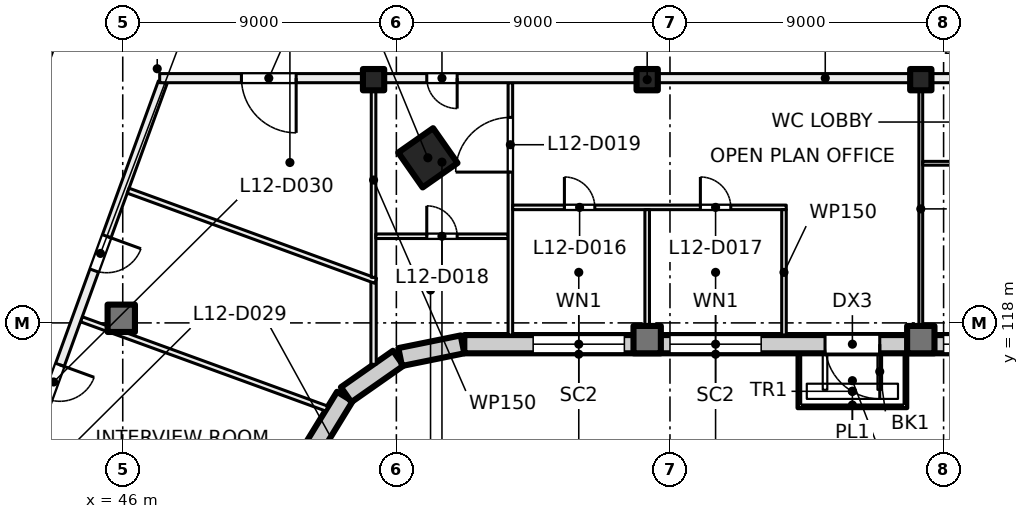
"""IFC4 building model, lengths in metres.
Left out: names, types, materials, properties, quantities, classifications, styles, units other than length and angle.
Written with IfcOpenShell. Run it as: python <this file> out.ifc"""

import sys

from ifc_helpers import new_model, si_unit, direction, frame, frame_2d, origin, origin_2d, place, context, subcontext, project, spatial, rectangle, hollow_rectangle, extrude, element, fill, save


model = new_model("IFC4")
c1 = context("Model", 3, precision=1e-05, world=origin(), true_north=direction((0.0, 1.0)))
c2 = subcontext(c1, "Body", "Model", "MODEL_VIEW")
j1 = project(units=[si_unit("LENGTHUNIT", "METRE"), si_unit("PLANEANGLEUNIT", "RADIAN")], contexts=[c1])
p1 = place(None, origin())
s1 = spatial("IfcSite", under=j1, at=p1, CompositionType="ELEMENT")
p2 = place(p1, origin())
s2 = spatial("IfcBuilding", under=s1, at=p2, CompositionType="ELEMENT")
p3 = place(p2, frame((0.0, 0.0, 55.5)))
s3 = spatial("IfcBuildingStorey", under=s2, at=p3, CompositionType="ELEMENT", Elevation=55.5)
p4 = place(p3, frame((56.036, 123.43, 0.0), z_axis=(0.0, 0.0, 1.0), x_axis=(0.573576436351, -0.819152044289, 0.0)))
e1 = element("IfcColumn", 1, at=p4, inside=s3, PredefinedType="COLUMN", context=c2, shape_type="SweptSolid", body=[
    extrude(hollow_rectangle(XDim=1.4, YDim=1.4, WallThickness=0.04, at=origin_2d()), origin(), (0.0, 0.0, 1.0), 4.0),
])
for number, where, z_axis, x_axis in (
    (2, (54.25, 126.0, 0.0), (0.0, 0.0, 1.0), (1.0, 0.0, 0.0)),
    (3, (63.25, 126.0, 0.0), (0.0, 0.0, 1.0), (1.0, 0.0, 0.0)),
    (4, (72.25, 126.0, 0.0), (0.0, 0.0, 1.0), (1.0, 0.0, 0.0)),
):
    element("IfcColumn", number, at=place(p3, frame(where, z_axis=z_axis, x_axis=x_axis)), inside=s3, PredefinedType="COLUMN", context=c2, shape_type="SweptSolid", body=[
        extrude(rectangle(XDim=0.7, YDim=0.7, at=origin_2d()), origin(), (0.0, 0.0, 1.0), 4.0),
    ])
for number, where, z_axis, x_axis in (
    (5, (45.952, 118.152, 0.0), (0.0, 0.0, 1.0), (1.0, 0.0, 0.0)),
    (6, (63.25, 117.45, 0.0), (0.0, 0.0, 1.0), (1.0, 0.0, 0.0)),
    (7, (72.25, 117.45, 0.0), (0.0, 0.0, 1.0), (1.0, 0.0, 0.0)),
):
    element("IfcColumn", number, at=place(p3, frame(where, z_axis=z_axis, x_axis=x_axis)), inside=s3, PredefinedType="COLUMN", context=c2, shape_type="SweptSolid", body=[
        extrude(rectangle(XDim=0.9, YDim=0.9, at=origin_2d()), origin(), (0.0, 0.0, 1.0), 4.0),
    ])
p5 = place(p3, frame((53.305, 115.578, 0.0), z_axis=(0.0, 0.0, 1.0), x_axis=(-0.522402266438, -0.852699168535, 0.0)))
e8 = element("IfcWall", 8, at=p5, inside=s3, PredefinedType="SOLIDWALL", context=c2, shape_type="SweptSolid", body=[
    extrude(rectangle(XDim=2.042, YDim=0.6, at=frame_2d((1.021, 0.0))), origin(), (0.0, 0.0, 1.0), 3.625),
])
for number, where, z_axis, x_axis in (
    (9, (55.062, 116.839, 0.0), (0.0, 0.0, 1.0), (-0.819, -0.574, 0.0)),
    (10, (57.175, 117.294, 0.0), (0.0, 0.0, 1.0), (-0.98, -0.199, 0.0)),
):
    element("IfcWall", number, at=place(p3, frame(where, z_axis=z_axis, x_axis=x_axis)), inside=s3, PredefinedType="SOLIDWALL", context=c2, shape_type="SweptSolid", body=[
        extrude(rectangle(XDim=2.092, YDim=0.6, at=frame_2d((1.046, 0.0))), origin(), (0.0, 0.0, 1.0), 3.625),
    ])
p6 = place(p3, frame((90.98, 117.3, 0.0), z_axis=(0.0, 0.0, 1.0), x_axis=(-1.0, 0.0, 0.0)))
e11 = element("IfcWall", 11, at=p6, inside=s3, PredefinedType="SOLIDWALL", context=c2, shape_type="SweptSolid", body=[
    extrude(rectangle(XDim=33.745, YDim=0.6, at=frame_2d((16.873, 0.0))), origin(), (0.0, 0.0, 1.0), 3.625),
])
p7 = place(p6, frame((1.48, 0.0, 0.9)))
e12 = element("IfcOpeningElement", 12, at=p7, cuts=e11, PredefinedType="OPENING", context=c2, shape_type="SweptSolid", body=[
    extrude(rectangle(XDim=3.0, YDim=2.4, at=frame_2d((1.5, 1.2))), frame((0.0, 0.31, 0.0), z_axis=(0.0, -1.0, 0.0), x_axis=(1.0, 0.0, 0.0)), (0.0, 0.0, 1.0), 0.62),
])
p8 = place(p6, frame((5.98, 0.0, 0.9)))
e13 = element("IfcOpeningElement", 13, at=p8, cuts=e11, PredefinedType="OPENING", context=c2, shape_type="SweptSolid", body=[
    extrude(rectangle(XDim=3.0, YDim=2.4, at=frame_2d((1.5, 1.2))), frame((0.0, 0.31, 0.0), z_axis=(0.0, -1.0, 0.0), x_axis=(1.0, 0.0, 0.0)), (0.0, 0.0, 1.0), 0.62),
])
p9 = place(p6, frame((10.48, 0.0, 0.9)))
e14 = element("IfcOpeningElement", 14, at=p9, cuts=e11, PredefinedType="OPENING", context=c2, shape_type="SweptSolid", body=[
    extrude(rectangle(XDim=3.0, YDim=2.4, at=frame_2d((1.5, 1.2))), frame((0.0, 0.31, 0.0), z_axis=(0.0, -1.0, 0.0), x_axis=(1.0, 0.0, 0.0)), (0.0, 0.0, 1.0), 0.62),
])
p10 = place(p6, frame((14.98, 0.0, 0.9)))
e15 = element("IfcOpeningElement", 15, at=p10, cuts=e11, PredefinedType="OPENING", context=c2, shape_type="SweptSolid", body=[
    extrude(rectangle(XDim=3.0, YDim=2.4, at=frame_2d((1.5, 1.2))), frame((0.0, 0.31, 0.0), z_axis=(0.0, -1.0, 0.0), x_axis=(1.0, 0.0, 0.0)), (0.0, 0.0, 1.0), 0.62),
])
p11 = place(p6, frame((20.08, 0.0, 0.0)))
e16 = element("IfcOpeningElement", 16, at=p11, cuts=e11, PredefinedType="OPENING", context=c2, shape_type="SweptSolid", body=[
    extrude(rectangle(XDim=1.8, YDim=2.4, at=frame_2d((0.9, 1.2))), frame((0.0, 0.31, 0.0), z_axis=(0.0, -1.0, 0.0), x_axis=(1.0, 0.0, 0.0)), (0.0, 0.0, 1.0), 0.62),
])
p12 = place(p6, frame((23.98, 0.0, 0.9)))
e17 = element("IfcOpeningElement", 17, at=p12, cuts=e11, PredefinedType="OPENING", context=c2, shape_type="SweptSolid", body=[
    extrude(rectangle(XDim=3.0, YDim=2.4, at=frame_2d((1.5, 1.2))), frame((0.0, 0.31, 0.0), z_axis=(0.0, -1.0, 0.0), x_axis=(1.0, 0.0, 0.0)), (0.0, 0.0, 1.0), 0.62),
])
p13 = place(p6, frame((28.48, 0.0, 0.9)))
e18 = element("IfcOpeningElement", 18, at=p13, cuts=e11, PredefinedType="OPENING", context=c2, shape_type="SweptSolid", body=[
    extrude(rectangle(XDim=3.0, YDim=2.4, at=frame_2d((1.5, 1.2))), frame((0.0, 0.31, 0.0), z_axis=(0.0, -1.0, 0.0), x_axis=(1.0, 0.0, 0.0)), (0.0, 0.0, 1.0), 0.62),
])
p14 = place(p3, frame((32.881, 97.657, 0.0), z_axis=(0.0, 0.0, 1.0), x_axis=(0.342017360004, 0.939693633828, 0.0)))
e19 = element("IfcWall", 19, at=p14, inside=s3, PredefinedType="PARTITIONING", context=c2, shape_type="SweptSolid", body=[
    extrude(rectangle(XDim=34.516, YDim=0.3, at=frame_2d((17.258, 0.0))), origin(), (0.0, 0.0, 1.0), 3.625),
])
p15 = place(p14, frame((12.975, 0.0, 0.0)))
e20 = element("IfcOpeningElement", 20, at=p15, cuts=e19, PredefinedType="OPENING", context=c2, shape_type="SweptSolid", body=[
    extrude(rectangle(XDim=1.8, YDim=2.1, at=frame_2d((0.9, 1.05))), frame((0.0, 0.16, 0.0), z_axis=(0.0, -1.0, 0.0), x_axis=(1.0, 0.0, 0.0)), (0.0, 0.0, 1.0), 0.32),
])
p16 = place(p3, frame((44.639, 118.12, 0.0), z_axis=(0.0, 0.0, 1.0), x_axis=(0.939669707102, -0.342083091593, 0.0)))
e21 = element("IfcWall", 21, at=p16, inside=s3, PredefinedType="PARTITIONING", context=c2, shape_type="SweptSolid", body=[
    extrude(rectangle(XDim=8.589, YDim=0.175, at=frame_2d((4.295, 0.0))), origin(), (0.0, 0.0, 1.0), 3.625),
])
p17 = place(p3, frame((47.314, 125.909, 0.0), z_axis=(0.0, 0.0, 1.0), x_axis=(-0.342010770371, -0.939696032209, 0.0)))
e22 = element("IfcWall", 22, at=p17, inside=s3, PredefinedType="PARTITIONING", context=c2, shape_type="SweptSolid", body=[
    extrude(rectangle(XDim=31.485, YDim=0.3, at=frame_2d((15.742, 0.0))), origin(), (0.0, 0.0, 1.0), 3.625),
])
p18 = place(p17, frame((28.259, 0.0, 0.0)))
e23 = element("IfcOpeningElement", 23, at=p18, cuts=e22, PredefinedType="OPENING", context=c2, shape_type="SweptSolid", body=[
    extrude(rectangle(XDim=1.2, YDim=2.1, at=frame_2d((0.6, 1.05))), frame((0.0, 0.16, 0.0), z_axis=(0.0, -1.0, 0.0), x_axis=(1.0, 0.0, 0.0)), (0.0, 0.0, 1.0), 0.32),
])
p19 = place(p17, frame((23.484, 0.0, 0.0)))
e24 = element("IfcOpeningElement", 24, at=p19, cuts=e22, PredefinedType="OPENING", context=c2, shape_type="SweptSolid", body=[
    extrude(rectangle(XDim=1.0, YDim=2.1, at=frame_2d((0.5, 1.05))), frame((0.0, 0.16, 0.0), z_axis=(0.0, -1.0, 0.0), x_axis=(1.0, 0.0, 0.0)), (0.0, 0.0, 1.0), 0.32),
])
p20 = place(p17, frame((18.984, 0.0, 0.0)))
e25 = element("IfcOpeningElement", 25, at=p20, cuts=e22, PredefinedType="OPENING", context=c2, shape_type="SweptSolid", body=[
    extrude(rectangle(XDim=1.0, YDim=2.1, at=frame_2d((0.5, 1.05))), frame((0.0, 0.16, 0.0), z_axis=(0.0, -1.0, 0.0), x_axis=(1.0, 0.0, 0.0)), (0.0, 0.0, 1.0), 0.32),
])
p21 = place(p17, frame((14.385, 0.0, 0.0)))
e26 = element("IfcOpeningElement", 26, at=p21, cuts=e22, PredefinedType="OPENING", context=c2, shape_type="SweptSolid", body=[
    extrude(rectangle(XDim=1.2, YDim=2.1, at=frame_2d((0.6, 1.05))), frame((0.0, 0.16, 0.0), z_axis=(0.0, -1.0, 0.0), x_axis=(1.0, 0.0, 0.0)), (0.0, 0.0, 1.0), 0.32),
])
p22 = place(p17, frame((9.885, 0.0, 0.0)))
e27 = element("IfcOpeningElement", 27, at=p22, cuts=e22, PredefinedType="OPENING", context=c2, shape_type="SweptSolid", body=[
    extrude(rectangle(XDim=1.2, YDim=2.1, at=frame_2d((0.6, 1.05))), frame((0.0, 0.16, 0.0), z_axis=(0.0, -1.0, 0.0), x_axis=(1.0, 0.0, 0.0)), (0.0, 0.0, 1.0), 0.32),
])
p23 = place(p17, frame((5.384, 0.0, 0.0)))
e28 = element("IfcOpeningElement", 28, at=p23, cuts=e22, PredefinedType="OPENING", context=c2, shape_type="SweptSolid", body=[
    extrude(rectangle(XDim=1.2, YDim=2.1, at=frame_2d((0.6, 1.05))), frame((0.0, 0.16, 0.0), z_axis=(0.0, -1.0, 0.0), x_axis=(1.0, 0.0, 0.0)), (0.0, 0.0, 1.0), 0.32),
])
p24 = place(p3, frame((54.25, 116.637, 0.0), z_axis=(0.0, 0.0, 1.0), x_axis=(0.0, 1.0, 0.0)))
e29 = element("IfcWall", 29, at=p24, inside=s3, PredefinedType="PARTITIONING", context=c2, shape_type="SweptSolid", body=[
    extrude(rectangle(XDim=2.776, YDim=0.175, at=frame_2d((1.388, 0.0))), origin(), (0.0, 0.0, 1.0), 3.625),
])
p25 = place(p3, frame((54.32, 119.384, 0.0), z_axis=(0.0, 0.0, 1.0), x_axis=(-0.939632908118, 0.342184157994, 0.0)))
e30 = element("IfcWall", 30, at=p25, inside=s3, PredefinedType="PARTITIONING", context=c2, shape_type="SweptSolid", body=[
    extrude(rectangle(XDim=8.665, YDim=0.175, at=frame_2d((4.333, 0.0))), origin(), (0.0, 0.0, 1.0), 3.625),
])
p26 = place(p3, frame((54.25, 119.498, 0.0), z_axis=(0.0, 0.0, 1.0), x_axis=(0.0, 1.0, 0.0)))
e31 = element("IfcWall", 31, at=p26, inside=s3, PredefinedType="PARTITIONING", context=c2, shape_type="SweptSolid", body=[
    extrude(rectangle(XDim=6.402, YDim=0.15, at=frame_2d((3.201, 0.0))), origin(), (0.0, 0.0, 1.0), 3.625),
])
p27 = place(p3, frame((54.325, 120.85, 0.0), z_axis=(0.0, 0.0, 1.0), x_axis=(1.0, 0.0, 0.0)))
e32 = element("IfcWall", 32, at=p27, inside=s3, PredefinedType="PARTITIONING", context=c2, shape_type="SweptSolid", body=[
    extrude(rectangle(XDim=4.35, YDim=0.15, at=frame_2d((2.175, 0.0))), origin(), (0.0, 0.0, 1.0), 3.625),
])
p28 = place(p27, frame((1.675, 0.0, 0.0)))
e33 = element("IfcOpeningElement", 33, at=p28, cuts=e32, PredefinedType="OPENING", context=c2, shape_type="SweptSolid", body=[
    extrude(rectangle(XDim=1.0, YDim=2.1, at=frame_2d((0.5, 1.05))), frame((0.0, 0.085, 0.0), z_axis=(0.0, -1.0, 0.0), x_axis=(1.0, 0.0, 0.0)), (0.0, 0.0, 1.0), 0.17),
])
p29 = place(p3, frame((58.75, 117.6, 0.0), z_axis=(0.0, 0.0, 1.0), x_axis=(0.0, 1.0, 0.0)))
e34 = element("IfcWall", 34, at=p29, inside=s3, PredefinedType="PARTITIONING", context=c2, shape_type="SweptSolid", body=[
    extrude(rectangle(XDim=8.3, YDim=0.15, at=frame_2d((4.15, 0.0))), origin(), (0.0, 0.0, 1.0), 3.625),
])
p30 = place(p29, frame((5.36, 0.0, 0.0)))
e35 = element("IfcOpeningElement", 35, at=p30, cuts=e34, PredefinedType="OPENING", context=c2, shape_type="SweptSolid", body=[
    extrude(rectangle(XDim=1.8, YDim=2.1, at=frame_2d((0.9, 1.05))), frame((0.0, 0.085, 0.0), z_axis=(0.0, -1.0, 0.0), x_axis=(1.0, 0.0, 0.0)), (0.0, 0.0, 1.0), 0.17),
])
p31 = place(p3, frame((58.825, 121.8, 0.0), z_axis=(0.0, 0.0, 1.0), x_axis=(1.0, 0.0, 0.0)))
e36 = element("IfcWall", 36, at=p31, inside=s3, PredefinedType="PARTITIONING", context=c2, shape_type="SweptSolid", body=[
    extrude(rectangle(XDim=9.0, YDim=0.15, at=frame_2d((4.5, 0.0))), origin(), (0.0, 0.0, 1.0), 3.625),
])
p32 = place(p31, frame((1.702, 0.0, 0.0)))
e37 = element("IfcOpeningElement", 37, at=p32, cuts=e36, PredefinedType="OPENING", context=c2, shape_type="SweptSolid", body=[
    extrude(rectangle(XDim=1.0, YDim=2.1, at=frame_2d((0.5, 1.05))), frame((0.0, 0.085, 0.0), z_axis=(0.0, -1.0, 0.0), x_axis=(1.0, 0.0, 0.0)), (0.0, 0.0, 1.0), 0.17),
])
p33 = place(p31, frame((6.175, 0.0, 0.0)))
e38 = element("IfcOpeningElement", 38, at=p33, cuts=e36, PredefinedType="OPENING", context=c2, shape_type="SweptSolid", body=[
    extrude(rectangle(XDim=1.0, YDim=2.1, at=frame_2d((0.5, 1.05))), frame((0.0, 0.085, 0.0), z_axis=(0.0, -1.0, 0.0), x_axis=(1.0, 0.0, 0.0)), (0.0, 0.0, 1.0), 0.17),
])
for number, where, z_axis, x_axis in (
    (39, (63.25, 121.725, 0.0), (0.0, 0.0, 1.0), (0.0, -1.0, 0.0)),
    (40, (67.75, 117.6, 0.0), (0.0, 0.0, 1.0), (0.0, 1.0, 0.0)),
):
    element("IfcWall", number, at=place(p3, frame(where, z_axis=z_axis, x_axis=x_axis)), inside=s3, PredefinedType="PARTITIONING", context=c2, shape_type="SweptSolid", body=[
        extrude(rectangle(XDim=4.125, YDim=0.15, at=frame_2d((2.062, 0.0))), origin(), (0.0, 0.0, 1.0), 3.625),
    ])
p34 = place(p3, frame((72.25, 117.6, 0.0), z_axis=(0.0, 0.0, 1.0), x_axis=(0.0, 1.0, 0.0)))
e41 = element("IfcWall", 41, at=p34, inside=s3, PredefinedType="PARTITIONING", context=c2, shape_type="SweptSolid", body=[
    extrude(rectangle(XDim=8.3, YDim=0.125, at=frame_2d((4.15, 0.0))), origin(), (0.0, 0.0, 1.0), 3.625),
])
p35 = place(p3, frame((81.188, 123.25, 0.0), z_axis=(0.0, 0.0, 1.0), x_axis=(-1.0, 0.0, 0.0)))
e42 = element("IfcWall", 42, at=p35, inside=s3, PredefinedType="PARTITIONING", context=c2, shape_type="SweptSolid", body=[
    extrude(rectangle(XDim=8.876, YDim=0.125, at=frame_2d((4.438, 0.0))), origin(), (0.0, 0.0, 1.0), 3.625),
])
p36 = place(p35, frame((6.267, 0.0, 0.0)))
e43 = element("IfcOpeningElement", 43, at=p36, cuts=e42, PredefinedType="OPENING", context=c2, shape_type="SweptSolid", body=[
    extrude(rectangle(XDim=0.8, YDim=2.1, at=frame_2d((0.4, 1.05))), frame((0.0, 0.073, 0.0), z_axis=(0.0, -1.0, 0.0), x_axis=(1.0, 0.0, 0.0)), (0.0, 0.0, 1.0), 0.145),
])
p37 = place(p35, frame((3.037, 0.0, 0.0)))
e44 = element("IfcOpeningElement", 44, at=p37, cuts=e42, PredefinedType="OPENING", context=c2, shape_type="SweptSolid", body=[
    extrude(rectangle(XDim=0.8, YDim=2.1, at=frame_2d((0.4, 1.05))), frame((0.0, 0.073, 0.0), z_axis=(0.0, -1.0, 0.0), x_axis=(1.0, 0.0, 0.0)), (0.0, 0.0, 1.0), 0.145),
])
p38 = place(p3, frame((91.0, 126.05, 0.0), z_axis=(0.0, 0.0, 1.0), x_axis=(-1.0, 0.0, 0.0)))
e45 = element("IfcWall", 45, at=p38, inside=s3, PredefinedType="PARTITIONING", context=c2, shape_type="SweptSolid", body=[
    extrude(rectangle(XDim=43.785, YDim=0.3, at=frame_2d((21.893, 0.0))), origin(), (0.0, 0.0, 1.0), 3.625),
])
p39 = place(p38, frame((4.375, 0.0, 0.0)))
e46 = element("IfcOpeningElement", 46, at=p39, cuts=e45, PredefinedType="OPENING", context=c2, shape_type="SweptSolid", body=[
    extrude(rectangle(XDim=1.0, YDim=2.1, at=frame_2d((0.5, 1.05))), frame((0.0, 0.16, 0.0), z_axis=(0.0, -1.0, 0.0), x_axis=(1.0, 0.0, 0.0)), (0.0, 0.0, 1.0), 0.32),
])
p40 = place(p38, frame((15.0, 0.0, 0.0)))
e47 = element("IfcOpeningElement", 47, at=p40, cuts=e45, PredefinedType="OPENING", context=c2, shape_type="SweptSolid", body=[
    extrude(rectangle(XDim=1.0, YDim=2.1, at=frame_2d((0.5, 1.05))), frame((0.0, 0.16, 0.0), z_axis=(0.0, -1.0, 0.0), x_axis=(1.0, 0.0, 0.0)), (0.0, 0.0, 1.0), 0.32),
])
p41 = place(p38, frame((34.0, 0.0, 0.0)))
e48 = element("IfcOpeningElement", 48, at=p41, cuts=e45, PredefinedType="OPENING", context=c2, shape_type="SweptSolid", body=[
    extrude(rectangle(XDim=1.0, YDim=2.1, at=frame_2d((0.5, 1.05))), frame((0.0, 0.16, 0.0), z_axis=(0.0, -1.0, 0.0), x_axis=(1.0, 0.0, 0.0)), (0.0, 0.0, 1.0), 0.32),
])
p42 = place(p38, frame((39.296, 0.0, 0.0)))
e49 = element("IfcOpeningElement", 49, at=p42, cuts=e45, PredefinedType="OPENING", context=c2, shape_type="SweptSolid", body=[
    extrude(rectangle(XDim=1.8, YDim=2.1, at=frame_2d((0.9, 1.05))), frame((0.0, 0.16, 0.0), z_axis=(0.0, -1.0, 0.0), x_axis=(1.0, 0.0, 0.0)), (0.0, 0.0, 1.0), 0.32),
])
p43 = place(p10, origin())
e50 = element("IfcWindow", 50, at=p43, inside=s3, PartitioningType="SINGLE_PANEL", PredefinedType="WINDOW", context=c2, shape_type="SweptSolid", body=[
    extrude(rectangle(XDim=3.0, YDim=2.4, at=frame_2d((1.5, 1.2))), frame((0.0, 0.03, 0.0), z_axis=(0.0, -1.0, 0.0), x_axis=(1.0, 0.0, 0.0)), (0.0, 0.0, 1.0), 0.06),
])
fill(e15, e50)
p44 = place(p11, origin())
e51 = element("IfcDoor", 51, at=p44, inside=s3, OperationType="DOUBLE_DOOR_SINGLE_SWING", PredefinedType="DOOR", context=c2, shape_type="SweptSolid", body=[
    extrude(rectangle(XDim=1.8, YDim=2.4, at=frame_2d((0.9, 1.2))), frame((0.0, 0.025, 0.0), z_axis=(0.0, -1.0, 0.0), x_axis=(1.0, 0.0, 0.0)), (0.0, 0.0, 1.0), 0.05),
])
fill(e16, e51)
p45 = place(p12, origin())
e52 = element("IfcWindow", 52, at=p45, inside=s3, PartitioningType="SINGLE_PANEL", PredefinedType="WINDOW", context=c2, shape_type="SweptSolid", body=[
    extrude(rectangle(XDim=3.0, YDim=2.4, at=frame_2d((1.5, 1.2))), frame((0.0, 0.03, 0.0), z_axis=(0.0, -1.0, 0.0), x_axis=(1.0, 0.0, 0.0)), (0.0, 0.0, 1.0), 0.06),
])
fill(e17, e52)
p46 = place(p13, origin())
e53 = element("IfcWindow", 53, at=p46, inside=s3, PartitioningType="SINGLE_PANEL", PredefinedType="WINDOW", context=c2, shape_type="SweptSolid", body=[
    extrude(rectangle(XDim=3.0, YDim=2.4, at=frame_2d((1.5, 1.2))), frame((0.0, 0.03, 0.0), z_axis=(0.0, -1.0, 0.0), x_axis=(1.0, 0.0, 0.0)), (0.0, 0.0, 1.0), 0.06),
])
fill(e18, e53)
p47 = place(p41, origin())
e54 = element("IfcDoor", 54, at=p47, inside=s3, OperationType="SINGLE_SWING_LEFT", PredefinedType="DOOR", context=c2, shape_type="SweptSolid", body=[
    extrude(rectangle(XDim=1.0, YDim=2.1, at=frame_2d((0.5, 1.05))), frame((0.0, 0.025, 0.0), z_axis=(0.0, -1.0, 0.0), x_axis=(1.0, 0.0, 0.0)), (0.0, 0.0, 1.0), 0.05),
])
fill(e48, e54)
p48 = place(p32, origin())
e55 = element("IfcDoor", 55, at=p48, inside=s3, OperationType="SINGLE_SWING_LEFT", PredefinedType="DOOR", context=c2, shape_type="SweptSolid", body=[
    extrude(rectangle(XDim=1.0, YDim=2.1, at=frame_2d((0.5, 1.05))), frame((0.0, 0.025, 0.0), z_axis=(0.0, -1.0, 0.0), x_axis=(1.0, 0.0, 0.0)), (0.0, 0.0, 1.0), 0.05),
])
fill(e37, e55)
p49 = place(p33, origin())
e56 = element("IfcDoor", 56, at=p49, inside=s3, OperationType="SINGLE_SWING_RIGHT", PredefinedType="DOOR", context=c2, shape_type="SweptSolid", body=[
    extrude(rectangle(XDim=1.0, YDim=2.1, at=frame_2d((0.5, 1.05))), frame((0.0, 0.025, 0.0), z_axis=(0.0, -1.0, 0.0), x_axis=(1.0, 0.0, 0.0)), (0.0, 0.0, 1.0), 0.05),
])
fill(e38, e56)
p50 = place(p28, origin())
e57 = element("IfcDoor", 57, at=p50, inside=s3, OperationType="SINGLE_SWING_LEFT", PredefinedType="DOOR", context=c2, shape_type="SweptSolid", body=[
    extrude(rectangle(XDim=1.0, YDim=2.1, at=frame_2d((0.5, 1.05))), frame((0.0, 0.025, 0.0), z_axis=(0.0, -1.0, 0.0), x_axis=(1.0, 0.0, 0.0)), (0.0, 0.0, 1.0), 0.05),
])
fill(e33, e57)
p51 = place(p30, origin())
e58 = element("IfcDoor", 58, at=p51, inside=s3, OperationType="DOUBLE_DOOR_SINGLE_SWING", PredefinedType="DOOR", context=c2, shape_type="SweptSolid", body=[
    extrude(rectangle(XDim=1.8, YDim=2.1, at=frame_2d((0.9, 1.05))), frame((0.0, 0.025, 0.0), z_axis=(0.0, -1.0, 0.0), x_axis=(1.0, 0.0, 0.0)), (0.0, 0.0, 1.0), 0.05),
])
fill(e35, e58)
p52 = place(p22, origin())
e59 = element("IfcDoor", 59, at=p52, inside=s3, OperationType="DOUBLE_DOOR_SINGLE_SWING", PredefinedType="DOOR", context=c2, shape_type="SweptSolid", body=[
    extrude(rectangle(XDim=1.2, YDim=2.1, at=frame_2d((0.6, 1.05))), frame((0.0, 0.025, 0.0), z_axis=(0.0, -1.0, 0.0), x_axis=(1.0, 0.0, 0.0)), (0.0, 0.0, 1.0), 0.05),
])
fill(e27, e59)
p53 = place(p23, origin())
e60 = element("IfcDoor", 60, at=p53, inside=s3, OperationType="DOUBLE_DOOR_SINGLE_SWING", PredefinedType="DOOR", context=c2, shape_type="SweptSolid", body=[
    extrude(rectangle(XDim=1.2, YDim=2.1, at=frame_2d((0.6, 1.05))), frame((0.0, 0.025, 0.0), z_axis=(0.0, -1.0, 0.0), x_axis=(1.0, 0.0, 0.0)), (0.0, 0.0, 1.0), 0.05),
])
fill(e28, e60)
p54 = place(p42, origin())
e61 = element("IfcDoor", 61, at=p54, inside=s3, OperationType="DOUBLE_DOOR_SINGLE_SWING", PredefinedType="DOOR", context=c2, shape_type="SweptSolid", body=[
    extrude(rectangle(XDim=1.8, YDim=2.1, at=frame_2d((0.9, 1.05))), frame((0.0, 0.025, 0.0), z_axis=(0.0, -1.0, 0.0), x_axis=(1.0, 0.0, 0.0)), (0.0, 0.0, 1.0), 0.05),
])
fill(e49, e61)
save(model, sys.argv[1])
